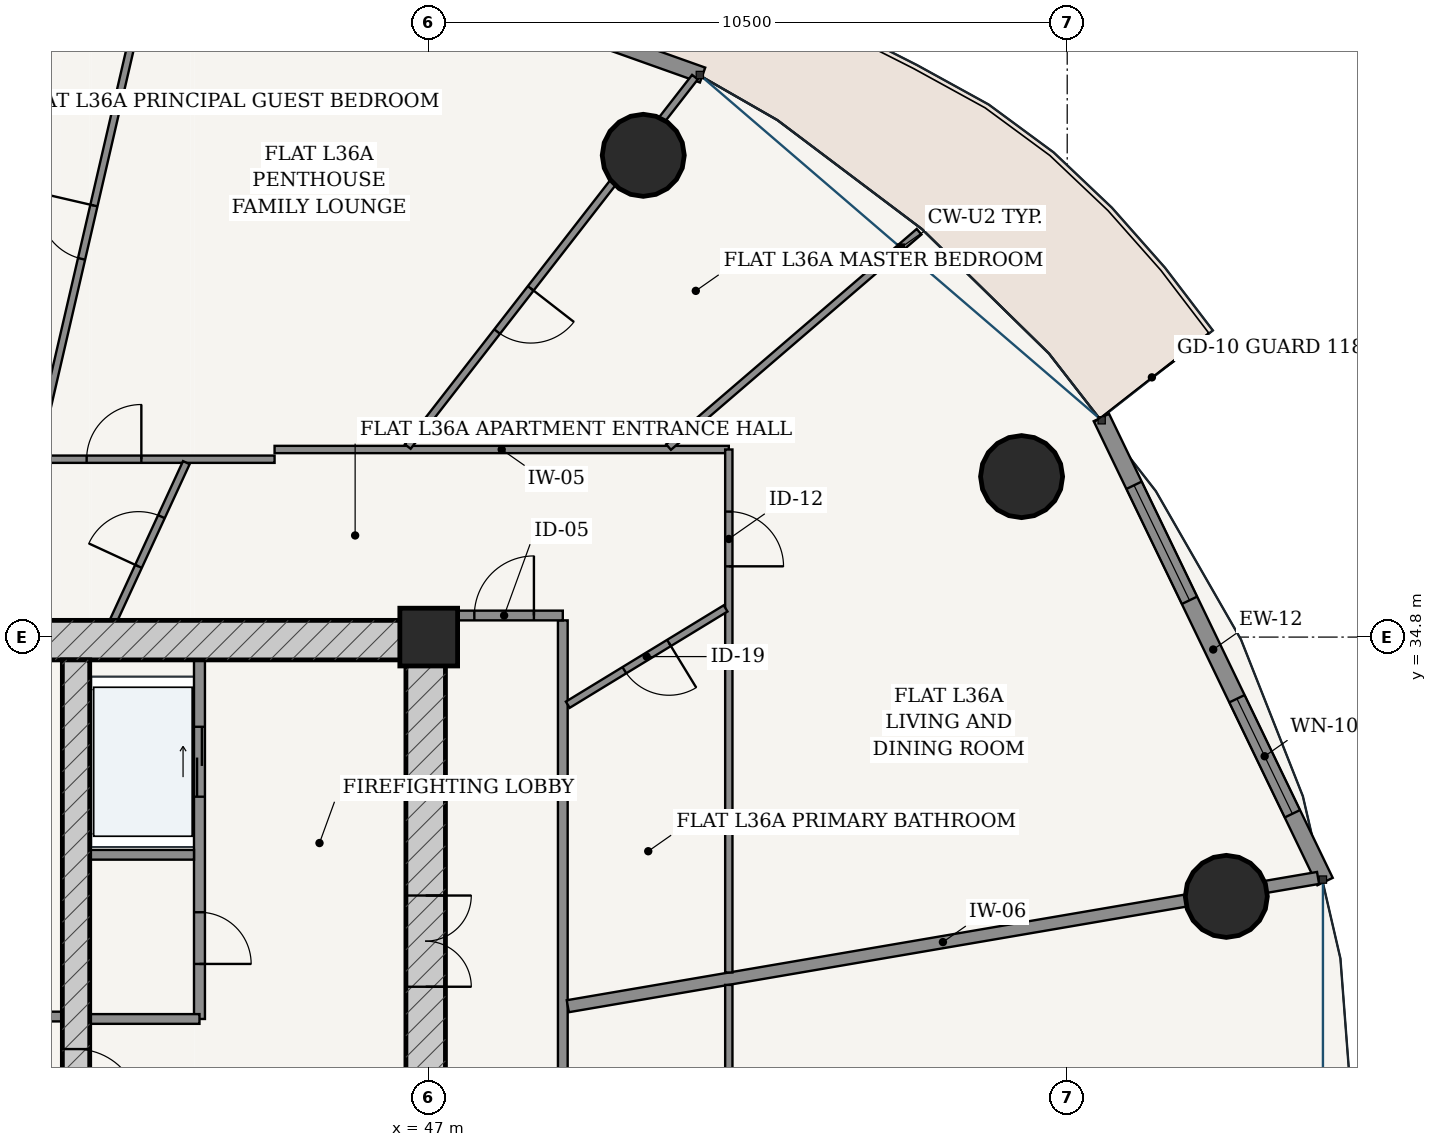
"""IFC4 building model, lengths in metres.
Left out: names, types, materials, properties, quantities, classifications, styles, units other than length and angle.
Written with IfcOpenShell. Run it as: python <this file> out.ifc"""

import sys

from ifc_helpers import new_model, si_unit, direction, frame, frame_2d, origin, origin_2d, place, context, subcontext, project, spatial, rectangle, hollow_circle, extrude, source, transform, mapped, element, fill, save


model = new_model("IFC4")
c1 = context("Model", 3, precision=1e-05, world=origin(), true_north=direction((-0.2419218956, 0.970295726276)))
c2 = subcontext(c1, "Body", "Model", "MODEL_VIEW")
j1 = project(units=[si_unit("LENGTHUNIT", "METRE"), si_unit("PLANEANGLEUNIT", "RADIAN")], contexts=[c1])
p1 = place(None, origin())
s1 = spatial("IfcSite", under=j1, at=p1, CompositionType="ELEMENT")
p2 = place(p1, origin())
s2 = spatial("IfcBuilding", under=s1, at=p2, CompositionType="ELEMENT")
p3 = place(p2, frame((0.0, 0.0, 139.0)))
s3 = spatial("IfcBuildingStorey", under=s2, at=p3, CompositionType="ELEMENT", Elevation=139.0)
p4 = place(p3, frame((47.0, 34.8, 0.0), z_axis=(0.0, 0.0, 1.0), x_axis=(1.0, 0.0, 0.0)))
e1 = element("IfcColumn", 1, at=p4, inside=s3, PredefinedType="COLUMN", context=c2, shape_type="SweptSolid", body=[
    extrude(rectangle(XDim=0.95, YDim=0.95, at=origin_2d()), origin(), (0.0, 0.0, 1.0), 3.6),
])
p5 = place(p3, frame((28.725, 34.75, 0.0), z_axis=(0.0, 0.0, 1.0), x_axis=(1.0, 0.0, 0.0)))
e2 = element("IfcWall", 2, at=p5, inside=s3, PredefinedType="SHEAR", context=c2, shape_type="SweptSolid", body=[
    extrude(rectangle(XDim=18.55, YDim=0.65, at=frame_2d((9.275, 0.0))), origin(), (0.0, 0.0, 1.0), 3.33),
])
p6 = place(p3, frame((46.95, 19.175, 0.0), z_axis=(0.0, 0.0, 1.0), x_axis=(0.0, 1.0, 0.0)))
e3 = element("IfcWall", 3, at=p6, inside=s3, PredefinedType="SHEAR", context=c2, shape_type="SweptSolid", body=[
    extrude(rectangle(XDim=15.25, YDim=0.65, at=frame_2d((7.625, 0.0))), origin(), (0.0, 0.0, 1.0), 3.33),
])
p7 = place(p6, frame((9.875, 0.0, 0.0)))
e4 = element("IfcOpeningElement", 4, at=p7, cuts=e3, PredefinedType="OPENING", context=c2, shape_type="SweptSolid", body=[
    extrude(rectangle(XDim=1.5, YDim=2.2, at=frame_2d((0.75, 1.1))), frame((0.0, 0.335, 0.0), z_axis=(0.0, -1.0, 0.0), x_axis=(1.0, 0.0, 0.0)), (0.0, 0.0, 1.0), 0.67),
])
p8 = place(p3, frame((41.2, 19.175, 0.0), z_axis=(0.0, 0.0, 1.0), x_axis=(0.0, 1.0, 0.0)))
e5 = element("IfcWall", 5, at=p8, inside=s3, PredefinedType="SHEAR", context=c2, shape_type="SweptSolid", body=[
    extrude(rectangle(XDim=15.25, YDim=0.45, at=frame_2d((7.625, 0.0))), origin(), (0.0, 0.0, 1.0), 3.33),
])
p9 = place(p8, frame((7.8, 0.0, 0.0)))
e6 = element("IfcOpeningElement", 6, at=p9, cuts=e5, PredefinedType="OPENING", context=c2, shape_type="SweptSolid", body=[
    extrude(rectangle(XDim=1.05, YDim=2.15, at=frame_2d((0.525, 1.075))), frame((0.0, 0.235, 0.0), z_axis=(0.0, -1.0, 0.0), x_axis=(1.0, 0.0, 0.0)), (0.0, 0.0, 1.0), 0.47),
])
for number, where, z_axis, x_axis in (
    (7, (60.117, 30.536, 0.0), (0.0, 0.0, 1.0), (1.0, 0.0, 0.0)),
    (8, (56.75, 37.439, 0.0), (0.0, 0.0, 1.0), (1.0, 0.0, 0.0)),
    (9, (50.528, 42.723, 0.0), (0.0, 0.0, 1.0), (1.0, 0.0, 0.0)),
):
    element("IfcColumn", number, at=place(p3, frame(where, z_axis=z_axis, x_axis=x_axis)), inside=s3, PredefinedType="COLUMN", context=c2, shape_type="SweptSolid", body=[
        extrude(hollow_circle(Radius=0.675, WallThickness=0.042, at=origin_2d()), origin(), (0.0, 0.0, 1.0), 3.6),
    ])
p10 = place(p3, frame((61.74, 30.78, 0.0), z_axis=(0.0, 0.0, 1.0), x_axis=(-0.434209827226, 0.900811759437, 0.0)))
e10 = element("IfcWall", 10, at=p10, inside=s3, PredefinedType="SOLIDWALL", context=c2, shape_type="SweptSolid", body=[
    extrude(rectangle(XDim=8.472, YDim=0.28, at=frame_2d((4.236, 0.0))), origin(), (0.0, 0.0, 1.0), 3.33),
])
p11 = place(p10, frame((1.237, 0.0, 0.85)))
e11 = element("IfcOpeningElement", 11, at=p11, cuts=e10, PredefinedType="OPENING", context=c2, shape_type="SweptSolid", body=[
    extrude(rectangle(XDim=2.1, YDim=1.95, at=frame_2d((1.05, 0.975))), frame((0.0, 0.15, 0.0), z_axis=(0.0, -1.0, 0.0), x_axis=(1.0, 0.0, 0.0)), (0.0, 0.0, 1.0), 0.3),
])
p12 = place(p10, frame((5.134, 0.0, 0.85)))
e12 = element("IfcOpeningElement", 12, at=p12, cuts=e10, PredefinedType="OPENING", context=c2, shape_type="SweptSolid", body=[
    extrude(rectangle(XDim=2.1, YDim=1.95, at=frame_2d((1.05, 0.975))), frame((0.0, 0.15, 0.0), z_axis=(0.0, -1.0, 0.0), x_axis=(1.0, 0.0, 0.0)), (0.0, 0.0, 1.0), 0.3),
])
p13 = place(p3, frame((51.503, 44.043, 0.0), z_axis=(0.0, 0.0, 1.0), x_axis=(-0.942095406405, 0.335344964522, 0.0)))
e13 = element("IfcWall", 13, at=p13, inside=s3, PredefinedType="SOLIDWALL", context=c2, shape_type="SweptSolid", body=[
    extrude(rectangle(XDim=9.408, YDim=0.26, at=frame_2d((4.704, 0.0))), origin(), (0.0, 0.0, 1.0), 3.33),
])
p14 = place(p13, frame((4.029, 0.0, 0.0)))
e14 = element("IfcOpeningElement", 14, at=p14, cuts=e13, PredefinedType="OPENING", context=c2, shape_type="SweptSolid", body=[
    extrude(rectangle(XDim=1.35, YDim=2.2, at=frame_2d((0.675, 1.1))), frame((0.0, 0.14, 0.0), z_axis=(0.0, -1.0, 0.0), x_axis=(1.0, 0.0, 0.0)), (0.0, 0.0, 1.0), 0.28),
])
p15 = place(p3, frame((43.23, 28.52, 0.0), z_axis=(0.0, 0.0, 1.0), x_axis=(0.0, 1.0, 0.0)))
e15 = element("IfcWall", 15, at=p15, inside=s3, PredefinedType="PARTITIONING", context=c2, shape_type="SweptSolid", body=[
    extrude(rectangle(XDim=5.905, YDim=0.18, at=frame_2d((2.953, 0.0))), origin(), (0.0, 0.0, 1.0), 3.33),
])
p16 = place(p15, frame((0.905, 0.0, 0.0)))
e16 = element("IfcOpeningElement", 16, at=p16, cuts=e15, PredefinedType="OPENING", context=c2, shape_type="SweptSolid", body=[
    extrude(rectangle(XDim=0.85, YDim=2.1, at=frame_2d((0.425, 1.05))), frame((0.0, 0.1, 0.0), z_axis=(0.0, -1.0, 0.0), x_axis=(1.0, 0.0, 0.0)), (0.0, 0.0, 1.0), 0.2),
])
p17 = place(p15, frame((3.655, 0.0, 0.0)))
e17 = element("IfcOpeningElement", 17, at=p17, cuts=e15, PredefinedType="OPENING", context=c2, shape_type="SweptSolid", body=[
    extrude(rectangle(XDim=1.15, YDim=2.2, at=frame_2d((0.575, 1.1))), frame((0.0, 0.1, 0.0), z_axis=(0.0, -1.0, 0.0), x_axis=(1.0, 0.0, 0.0)), (0.0, 0.0, 1.0), 0.2),
])
p18 = place(p3, frame((41.425, 31.22, 0.0), z_axis=(0.0, 0.0, 1.0), x_axis=(1.0, 0.0, 0.0)))
e18 = element("IfcWall", 18, at=p18, inside=s3, PredefinedType="PARTITIONING", context=c2, shape_type="SweptSolid", body=[
    extrude(rectangle(XDim=1.715, YDim=0.16, at=frame_2d((0.857, 0.0))), origin(), (0.0, 0.0, 1.0), 3.33),
])
p19 = place(p3, frame((41.425, 28.52, 0.0), z_axis=(0.0, 0.0, 1.0), x_axis=(1.0, 0.0, 0.0)))
e19 = element("IfcWall", 19, at=p19, inside=s3, PredefinedType="PARTITIONING", context=c2, shape_type="SweptSolid", body=[
    extrude(rectangle(XDim=1.805, YDim=0.16, at=frame_2d((0.902, 0.0))), origin(), (0.0, 0.0, 1.0), 3.33),
])
p20 = place(p3, frame((35.025, 28.56, 0.0), z_axis=(0.0, 0.0, 1.0), x_axis=(1.0, 0.0, 0.0)))
e20 = element("IfcWall", 20, at=p20, inside=s3, PredefinedType="PARTITIONING", context=c2, shape_type="SweptSolid", body=[
    extrude(rectangle(XDim=5.95, YDim=0.16, at=frame_2d((2.975, 0.0))), origin(), (0.0, 0.0, 1.0), 3.33),
])
p21 = place(p20, frame((1.008, 0.0, 0.0)))
e21 = element("IfcOpeningElement", 21, at=p21, cuts=e20, PredefinedType="OPENING", context=c2, shape_type="SweptSolid", body=[
    extrude(rectangle(XDim=0.86, YDim=2.1, at=frame_2d((0.43, 1.05))), frame((0.0, 0.09, 0.0), z_axis=(0.0, -1.0, 0.0), x_axis=(1.0, 0.0, 0.0)), (0.0, 0.0, 1.0), 0.18),
])
p22 = place(p20, frame((4.087, 0.0, 0.0)))
e22 = element("IfcOpeningElement", 22, at=p22, cuts=e20, PredefinedType="OPENING", context=c2, shape_type="SweptSolid", body=[
    extrude(rectangle(XDim=0.85, YDim=2.1, at=frame_2d((0.425, 1.05))), frame((0.0, 0.09, 0.0), z_axis=(0.0, -1.0, 0.0), x_axis=(1.0, 0.0, 0.0)), (0.0, 0.0, 1.0), 0.18),
])
p23 = place(p3, frame((49.205, 16.675, 0.0), z_axis=(0.0, 0.0, 1.0), x_axis=(0.0, 1.0, 0.0)))
e23 = element("IfcWall", 23, at=p23, inside=s3, PredefinedType="PARTITIONING", context=c2, shape_type="SweptSolid", body=[
    extrude(rectangle(XDim=18.4, YDim=0.16, at=frame_2d((9.2, 0.0))), origin(), (0.0, 0.0, 1.0), 2.776),
])
p24 = place(p3, frame((47.275, 35.155, 0.0), z_axis=(0.0, 0.0, 1.0), x_axis=(1.0, 0.0, 0.0)))
e24 = element("IfcWall", 24, at=p24, inside=s3, PredefinedType="PARTITIONING", context=c2, shape_type="SweptSolid", body=[
    extrude(rectangle(XDim=1.93, YDim=0.16, at=frame_2d((0.965, 0.0))), origin(), (0.0, 0.0, 1.0), 2.776),
])
p25 = place(p24, frame((0.475, 0.0, 0.0)))
e25 = element("IfcOpeningElement", 25, at=p25, cuts=e24, PredefinedType="OPENING", context=c2, shape_type="SweptSolid", body=[
    extrude(rectangle(XDim=0.98, YDim=2.2, at=frame_2d((0.49, 1.1))), frame((0.0, 0.09, 0.0), z_axis=(0.0, -1.0, 0.0), x_axis=(1.0, 0.0, 0.0)), (0.0, 0.0, 1.0), 0.18),
])
p26 = place(p3, frame((49.287, 28.73, 0.0), z_axis=(0.0, 0.0, 1.0), x_axis=(0.985698993845, 0.168515558725, 0.0)))
e26 = element("IfcWall", 26, at=p26, inside=s3, PredefinedType="PARTITIONING", context=c2, shape_type="SweptSolid", body=[
    extrude(rectangle(XDim=12.517, YDim=0.2, at=frame_2d((6.259, 0.0))), origin(), (0.0, 0.0, 1.0), 2.776),
])
p27 = place(p3, frame((38.102, 37.725, 0.0), z_axis=(0.0, 0.0, 1.0), x_axis=(1.0, 0.0, 0.0)))
e27 = element("IfcWall", 27, at=p27, inside=s3, PredefinedType="PARTITIONING", context=c2, shape_type="SweptSolid", body=[
    extrude(rectangle(XDim=6.363, YDim=0.12, at=frame_2d((3.182, 0.0))), origin(), (0.0, 0.0, 1.0), 2.776),
])
p28 = place(p27, frame((3.272, 0.0, 0.0)))
e28 = element("IfcOpeningElement", 28, at=p28, cuts=e27, PredefinedType="OPENING", context=c2, shape_type="SweptSolid", body=[
    extrude(rectangle(XDim=0.9, YDim=2.15, at=frame_2d((0.45, 1.075))), frame((0.0, 0.07, 0.0), z_axis=(0.0, -1.0, 0.0), x_axis=(1.0, 0.0, 0.0)), (0.0, 0.0, 1.0), 0.14),
])
p29 = place(p3, frame((44.465, 37.885, 0.0), z_axis=(0.0, 0.0, 1.0), x_axis=(1.0, 0.0, 0.0)))
e29 = element("IfcWall", 29, at=p29, inside=s3, PredefinedType="PARTITIONING", context=c2, shape_type="SweptSolid", body=[
    extrude(rectangle(XDim=7.47, YDim=0.12, at=frame_2d((3.735, 0.0))), origin(), (0.0, 0.0, 1.0), 2.776),
])
p30 = place(p3, frame((51.935, 37.885, 0.0), z_axis=(0.0, 0.0, 1.0), x_axis=(0.0, -1.0, 0.0)))
e30 = element("IfcWall", 30, at=p30, inside=s3, PredefinedType="PARTITIONING", context=c2, shape_type="SweptSolid", body=[
    extrude(rectangle(XDim=8.601, YDim=0.12, at=frame_2d((4.3, 0.0))), origin(), (0.0, 0.0, 1.0), 2.776),
])
p31 = place(p30, frame((1.021, 0.0, 0.0)))
e31 = element("IfcOpeningElement", 31, at=p31, cuts=e30, PredefinedType="OPENING", context=c2, shape_type="SweptSolid", body=[
    extrude(rectangle(XDim=0.9, YDim=2.15, at=frame_2d((0.45, 1.075))), frame((0.0, 0.07, 0.0), z_axis=(0.0, -1.0, 0.0), x_axis=(1.0, 0.0, 0.0)), (0.0, 0.0, 1.0), 0.14),
])
p32 = place(p3, frame((50.944, 37.925, 0.0), z_axis=(0.0, 0.0, 1.0), x_axis=(0.758354915574, 0.65184186888, 0.0)))
e32 = element("IfcWall", 32, at=p32, inside=s3, PredefinedType="PARTITIONING", context=c2, shape_type="SweptSolid", body=[
    extrude(rectangle(XDim=5.432, YDim=0.12, at=frame_2d((2.716, 0.0))), origin(), (0.0, 0.0, 1.0), 2.846),
])
p33 = place(p3, frame((46.656, 37.934, 0.0), z_axis=(0.0, 0.0, 1.0), x_axis=(0.613758289074, 0.789493991487, 0.0)))
e33 = element("IfcWall", 33, at=p33, inside=s3, PredefinedType="PARTITIONING", context=c2, shape_type="SweptSolid", body=[
    extrude(rectangle(XDim=7.695, YDim=0.12, at=frame_2d((3.848, 0.0))), origin(), (0.0, 0.0, 1.0), 2.776),
])
p34 = place(p33, frame((2.395, 0.0, 0.0)))
e34 = element("IfcOpeningElement", 34, at=p34, cuts=e33, PredefinedType="OPENING", context=c2, shape_type="SweptSolid", body=[
    extrude(rectangle(XDim=0.9, YDim=2.15, at=frame_2d((0.45, 1.075))), frame((0.0, 0.07, 0.0), z_axis=(0.0, -1.0, 0.0), x_axis=(1.0, 0.0, 0.0)), (0.0, 0.0, 1.0), 0.14),
])
p35 = place(p3, frame((40.542, 37.785, 0.0), z_axis=(0.0, 0.0, 1.0), x_axis=(0.225467545633, 0.974250679171, 0.0)))
e35 = element("IfcWall", 35, at=p35, inside=s3, PredefinedType="PARTITIONING", context=c2, shape_type="SweptSolid", body=[
    extrude(rectangle(XDim=9.559, YDim=0.12, at=frame_2d((4.78, 0.0))), origin(), (0.0, 0.0, 1.0), 2.776),
])
p36 = place(p35, frame((3.32, 0.0, 0.0)))
e36 = element("IfcOpeningElement", 36, at=p36, cuts=e35, PredefinedType="OPENING", context=c2, shape_type="SweptSolid", body=[
    extrude(rectangle(XDim=0.9, YDim=2.15, at=frame_2d((0.45, 1.075))), frame((0.0, 0.07, 0.0), z_axis=(0.0, -1.0, 0.0), x_axis=(1.0, 0.0, 0.0)), (0.0, 0.0, 1.0), 0.14),
])
p37 = place(p3, frame((49.287, 33.688, 0.0), z_axis=(0.0, 0.0, 1.0), x_axis=(0.853628993111, 0.520881504874, 0.0)))
e37 = element("IfcWall", 37, at=p37, inside=s3, PredefinedType="PARTITIONING", context=c2, shape_type="SweptSolid", body=[
    extrude(rectangle(XDim=3.041, YDim=0.12, at=frame_2d((1.52, 0.0))), origin(), (0.0, 0.0, 1.0), 3.005),
])
p38 = place(p37, frame((1.09, 0.0, 0.0)))
e38 = element("IfcOpeningElement", 38, at=p38, cuts=e37, PredefinedType="OPENING", context=c2, shape_type="SweptSolid", body=[
    extrude(rectangle(XDim=0.86, YDim=2.15, at=frame_2d((0.43, 1.075))), frame((0.0, 0.07, 0.0), z_axis=(0.0, -1.0, 0.0), x_axis=(1.0, 0.0, 0.0)), (0.0, 0.0, 1.0), 0.14),
])
p39 = place(p3, frame((41.817, 35.075, 0.0), z_axis=(0.0, 0.0, 1.0), x_axis=(0.418890148101, 0.908036917655, 0.0)))
e39 = element("IfcWall", 39, at=p39, inside=s3, PredefinedType="PARTITIONING", context=c2, shape_type="SweptSolid", body=[
    extrude(rectangle(XDim=2.856, YDim=0.12, at=frame_2d((1.428, 0.0))), origin(), (0.0, 0.0, 1.0), 3.33),
])
p40 = place(p39, frame((0.978, 0.0, 0.0)))
e40 = element("IfcOpeningElement", 40, at=p40, cuts=e39, PredefinedType="OPENING", context=c2, shape_type="SweptSolid", body=[
    extrude(rectangle(XDim=0.9, YDim=2.15, at=frame_2d((0.45, 1.075))), frame((0.0, 0.07, 0.0), z_axis=(0.0, -1.0, 0.0), x_axis=(1.0, 0.0, 0.0)), (0.0, 0.0, 1.0), 0.14),
])
p41 = place(p3, frame((51.935, 29.08, 0.0), z_axis=(0.0, 0.0, 1.0), x_axis=(0.0, -1.0, 0.0)))
e41 = element("IfcWall", 41, at=p41, inside=s3, PredefinedType="PARTITIONING", context=c2, shape_type="SweptSolid", body=[
    extrude(rectangle(XDim=15.215, YDim=0.12, at=frame_2d((7.608, 0.0))), origin(), (0.0, 0.0, 1.0), 2.776),
])
p42 = place(p41, frame((11.859, 0.0, 0.0)))
e42 = element("IfcOpeningElement", 42, at=p42, cuts=e41, PredefinedType="OPENING", context=c2, shape_type="SweptSolid", body=[
    extrude(rectangle(XDim=0.9, YDim=2.15, at=frame_2d((0.45, 1.075))), frame((0.0, 0.07, 0.0), z_axis=(0.0, -1.0, 0.0), x_axis=(1.0, 0.0, 0.0)), (0.0, 0.0, 1.0), 0.14),
])
p43 = place(p41, frame((7.49, 0.0, 0.0)))
e43 = element("IfcOpeningElement", 43, at=p43, cuts=e41, PredefinedType="OPENING", context=c2, shape_type="SweptSolid", body=[
    extrude(rectangle(XDim=0.9, YDim=2.15, at=frame_2d((0.45, 1.075))), frame((0.0, 0.07, 0.0), z_axis=(0.0, -1.0, 0.0), x_axis=(1.0, 0.0, 0.0)), (0.0, 0.0, 1.0), 0.14),
])
m1 = source(origin(), c2, "Body", "SweptSolid", [
    extrude(rectangle(XDim=2.1, YDim=1.95, at=frame_2d((1.05, 0.975))), frame((0.0, 0.03, 0.0), z_axis=(0.0, -1.0, 0.0), x_axis=(1.0, 0.0, 0.0)), (0.0, 0.0, 1.0), 0.06),
])
p44 = place(p11, origin())
e44 = element("IfcWindow", 44, at=p44, inside=s3, PartitioningType="SINGLE_PANEL", PredefinedType="WINDOW", context=c2, shape_type="MappedRepresentation", body=[
    mapped(m1, transform((0.0, 0.0, 0.0), scale=1.0)),
])
fill(e11, e44)
p45 = place(p12, origin())
e45 = element("IfcWindow", 45, at=p45, inside=s3, PartitioningType="SINGLE_PANEL", PredefinedType="WINDOW", context=c2, shape_type="MappedRepresentation", body=[
    mapped(m1, transform((0.0, 0.0, 0.0), scale=1.0)),
])
fill(e12, e45)
m2 = source(origin(), c2, "Body", "SweptSolid", [
    extrude(rectangle(XDim=1.5, YDim=2.2, at=frame_2d((0.75, 1.1))), frame((0.0, 0.025, 0.0), z_axis=(0.0, -1.0, 0.0), x_axis=(1.0, 0.0, 0.0)), (0.0, 0.0, 1.0), 0.05),
])
p46 = place(p7, frame((1.5, 0.0, 0.0), z_axis=(0.0, 0.0, 1.0), x_axis=(-1.0, 0.0, 0.0)))
e46 = element("IfcDoor", 46, at=p46, inside=s3, OperationType="DOUBLE_DOOR_SINGLE_SWING", PredefinedType="DOOR", context=c2, shape_type="MappedRepresentation", body=[
    mapped(m2, transform((0.0, 0.0, 0.0), scale=1.0)),
])
fill(e4, e46)
m3 = source(origin(), c2, "Body", "SweptSolid", [
    extrude(rectangle(XDim=1.05, YDim=2.15, at=frame_2d((0.525, 1.075))), frame((0.0, 0.025, 0.0), z_axis=(0.0, -1.0, 0.0), x_axis=(1.0, 0.0, 0.0)), (0.0, 0.0, 1.0), 0.05),
])
p47 = place(p9, frame((1.05, 0.0, 0.0), z_axis=(0.0, 0.0, 1.0), x_axis=(-1.0, 0.0, 0.0)))
e47 = element("IfcDoor", 47, at=p47, inside=s3, OperationType="SINGLE_SWING_RIGHT", PredefinedType="DOOR", context=c2, shape_type="MappedRepresentation", body=[
    mapped(m3, transform((0.0, 0.0, 0.0), scale=1.0)),
])
fill(e6, e47)
m4 = source(origin(), c2, "Body", "SweptSolid", [
    extrude(rectangle(XDim=0.85, YDim=2.1, at=frame_2d((0.425, 1.05))), frame((0.0, 0.025, 0.0), z_axis=(0.0, -1.0, 0.0), x_axis=(1.0, 0.0, 0.0)), (0.0, 0.0, 1.0), 0.05),
])
p48 = place(p16, frame((0.85, 0.0, 0.0), z_axis=(0.0, 0.0, 1.0), x_axis=(-1.0, 0.0, 0.0)))
e48 = element("IfcDoor", 48, at=p48, inside=s3, OperationType="SINGLE_SWING_RIGHT", PredefinedType="DOOR", context=c2, shape_type="MappedRepresentation", body=[
    mapped(m4, transform((0.0, 0.0, 0.0), scale=1.0)),
])
fill(e16, e48)
m5 = source(origin(), c2, "Body", "SweptSolid", [
    extrude(rectangle(XDim=1.15, YDim=2.2, at=frame_2d((0.575, 1.1))), frame((0.0, 0.025, 0.0), z_axis=(0.0, -1.0, 0.0), x_axis=(1.0, 0.0, 0.0)), (0.0, 0.0, 1.0), 0.05),
])
p49 = place(p17, origin())
e49 = element("IfcDoor", 49, at=p49, inside=s3, OperationType="DOUBLE_DOOR_SLIDING", PredefinedType="DOOR", context=c2, shape_type="MappedRepresentation", body=[
    mapped(m5, transform((0.0, 0.0, 0.0), scale=1.0)),
])
fill(e17, e49)
m6 = source(origin(), c2, "Body", "SweptSolid", [
    extrude(rectangle(XDim=0.98, YDim=2.2, at=frame_2d((0.49, 1.1))), frame((0.0, 0.025, 0.0), z_axis=(0.0, -1.0, 0.0), x_axis=(1.0, 0.0, 0.0)), (0.0, 0.0, 1.0), 0.05),
])
p50 = place(p25, origin())
e50 = element("IfcDoor", 50, at=p50, inside=s3, OperationType="SINGLE_SWING_RIGHT", PredefinedType="DOOR", context=c2, shape_type="MappedRepresentation", body=[
    mapped(m6, transform((0.0, 0.0, 0.0), scale=1.0)),
])
fill(e25, e50)
m7 = source(origin(), c2, "Body", "SweptSolid", [
    extrude(rectangle(XDim=0.86, YDim=2.15, at=frame_2d((0.43, 1.075))), frame((0.0, 0.025, 0.0), z_axis=(0.0, -1.0, 0.0), x_axis=(1.0, 0.0, 0.0)), (0.0, 0.0, 1.0), 0.05),
])
p51 = place(p38, frame((0.86, 0.0, 0.0), z_axis=(0.0, 0.0, 1.0), x_axis=(-1.0, 0.0, 0.0)))
e51 = element("IfcDoor", 51, at=p51, inside=s3, OperationType="SINGLE_SWING_LEFT", PredefinedType="DOOR", context=c2, shape_type="MappedRepresentation", body=[
    mapped(m7, transform((0.0, 0.0, 0.0), scale=1.0)),
])
fill(e38, e51)
m8 = source(origin(), c2, "Body", "SweptSolid", [
    extrude(rectangle(XDim=0.9, YDim=2.15, at=frame_2d((0.45, 1.075))), frame((0.0, 0.025, 0.0), z_axis=(0.0, -1.0, 0.0), x_axis=(1.0, 0.0, 0.0)), (0.0, 0.0, 1.0), 0.05),
])
p52 = place(p31, origin())
e52 = element("IfcDoor", 52, at=p52, inside=s3, OperationType="SINGLE_SWING_RIGHT", PredefinedType="DOOR", context=c2, shape_type="MappedRepresentation", body=[
    mapped(m8, transform((0.0, 0.0, 0.0), scale=1.0)),
])
fill(e31, e52)
p53 = place(p40, origin())
e53 = element("IfcDoor", 53, at=p53, inside=s3, OperationType="SINGLE_SWING_LEFT", PredefinedType="DOOR", context=c2, shape_type="MappedRepresentation", body=[
    mapped(m8, transform((0.0, 0.0, 0.0), scale=1.0)),
])
fill(e40, e53)
p54 = place(p28, origin())
e54 = element("IfcDoor", 54, at=p54, inside=s3, OperationType="SINGLE_SWING_RIGHT", PredefinedType="DOOR", context=c2, shape_type="MappedRepresentation", body=[
    mapped(m8, transform((0.0, 0.0, 0.0), scale=1.0)),
])
fill(e28, e54)
p55 = place(p34, frame((0.9, 0.0, 0.0), z_axis=(0.0, 0.0, 1.0), x_axis=(-1.0, 0.0, 0.0)))
e55 = element("IfcDoor", 55, at=p55, inside=s3, OperationType="SINGLE_SWING_LEFT", PredefinedType="DOOR", context=c2, shape_type="MappedRepresentation", body=[
    mapped(m8, transform((0.0, 0.0, 0.0), scale=1.0)),
])
fill(e34, e55)
p56 = place(p36, origin())
e56 = element("IfcDoor", 56, at=p56, inside=s3, OperationType="SINGLE_SWING_RIGHT", PredefinedType="DOOR", context=c2, shape_type="MappedRepresentation", body=[
    mapped(m8, transform((0.0, 0.0, 0.0), scale=1.0)),
])
fill(e36, e56)
save(model, sys.argv[1])
